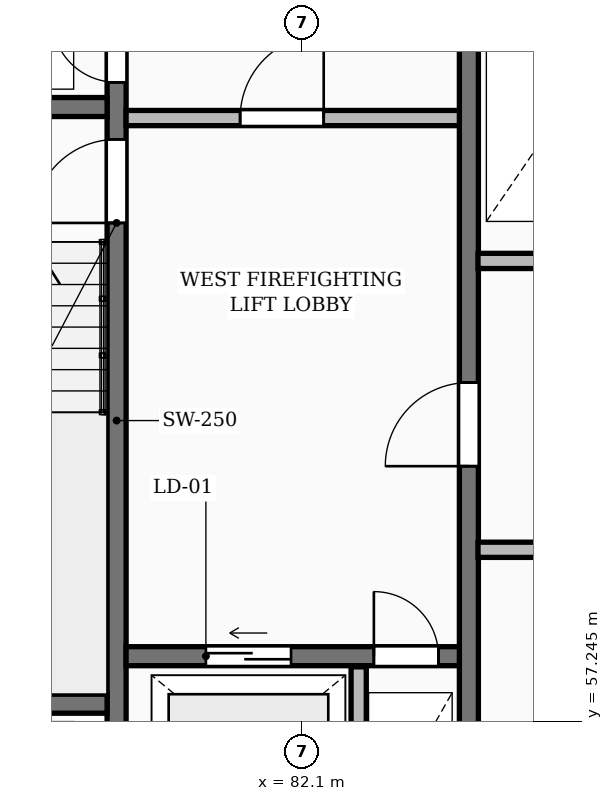
"""IFC4 building model, lengths in metres.
Left out: names, types, materials, properties, quantities, classifications, styles, units other than length and angle.
Written with IfcOpenShell. Run it as: python <this file> out.ifc"""

import sys

from ifc_helpers import new_model, si_unit, direction, frame, frame_2d, origin, place, context, subcontext, project, spatial, rectangle, extrude, element, fill, save


model = new_model("IFC4")
c1 = context("Model", 3, precision=1e-05, world=origin(), true_north=direction((0.0, 1.0)))
c2 = subcontext(c1, "Body", "Model", "MODEL_VIEW")
j1 = project(units=[si_unit("LENGTHUNIT", "METRE"), si_unit("PLANEANGLEUNIT", "RADIAN")], contexts=[c1])
p1 = place(None, origin())
s1 = spatial("IfcSite", under=j1, at=p1, CompositionType="ELEMENT")
p2 = place(p1, origin())
s2 = spatial("IfcBuilding", under=s1, at=p2, CompositionType="ELEMENT")
p3 = place(p2, frame((0.0, 0.0, 162.1)))
s3 = spatial("IfcBuildingStorey", under=s2, at=p3, CompositionType="ELEMENT", Elevation=162.1)
p4 = place(p3, frame((79.665, 55.4, 0.0), z_axis=(0.0, 0.0, 1.0), x_axis=(0.0, 1.0, 0.0)))
e1 = element("IfcWall", 1, at=p4, inside=s3, PredefinedType="SHEAR", context=c2, shape_type="SweptSolid", body=[
    extrude(rectangle(XDim=11.6, YDim=0.25, at=frame_2d((5.8, 0.0))), origin(), (0.0, 0.0, 1.0), 3.25),
])
p5 = place(p4, frame((0.55, 0.0, 0.0)))
e2 = element("IfcOpeningElement", 2, at=p5, cuts=e1, PredefinedType="OPENING", context=c2, shape_type="SweptSolid", body=[
    extrude(rectangle(XDim=0.85, YDim=2.05, at=frame_2d((0.425, 1.025))), frame((0.0, 0.135, 0.0), z_axis=(0.0, -1.0, 0.0), x_axis=(1.0, 0.0, 0.0)), (0.0, 0.0, 1.0), 0.27),
])
p6 = place(p4, frame((8.4, 0.0, 0.0)))
e3 = element("IfcOpeningElement", 3, at=p6, cuts=e1, PredefinedType="OPENING", context=c2, shape_type="SweptSolid", body=[
    extrude(rectangle(XDim=1.1, YDim=2.1, at=frame_2d((0.55, 1.05))), frame((0.0, 0.135, 0.0), z_axis=(0.0, -1.0, 0.0), x_axis=(1.0, 0.0, 0.0)), (0.0, 0.0, 1.0), 0.27),
])
p7 = place(p4, frame((10.25, 0.0, 0.0)))
e4 = element("IfcOpeningElement", 4, at=p7, cuts=e1, PredefinedType="OPENING", context=c2, shape_type="SweptSolid", body=[
    extrude(rectangle(XDim=0.85, YDim=2.05, at=frame_2d((0.425, 1.025))), frame((0.0, 0.135, 0.0), z_axis=(0.0, -1.0, 0.0), x_axis=(1.0, 0.0, 0.0)), (0.0, 0.0, 1.0), 0.27),
])
for number, where, z_axis, x_axis in (
    (5, (76.3, 57.475, 0.0), (0.0, 0.0, 1.0), (1.0, 0.0, 0.0)),
    (6, (76.3, 65.325, 0.0), (0.0, 0.0, 1.0), (1.0, 0.0, 0.0)),
):
    element("IfcWall", number, at=place(p3, frame(where, z_axis=z_axis, x_axis=x_axis)), inside=s3, PredefinedType="SHEAR", context=c2, shape_type="SweptSolid", body=[
        extrude(rectangle(XDim=3.24, YDim=0.25, at=frame_2d((1.62, 0.0))), origin(), (0.0, 0.0, 1.0), 3.25),
    ])
p8 = place(p3, frame((79.79, 58.1, 0.0), z_axis=(0.0, 0.0, 1.0), x_axis=(1.0, 0.0, 0.0)))
e7 = element("IfcWall", 7, at=p8, inside=s3, PredefinedType="SHEAR", context=c2, shape_type="SweptSolid", body=[
    extrude(rectangle(XDim=4.39, YDim=0.25, at=frame_2d((2.195, 0.0))), origin(), (0.0, 0.0, 1.0), 3.25),
])
p9 = place(p8, frame((1.05, 0.0, 0.0)))
e8 = element("IfcOpeningElement", 8, at=p9, cuts=e7, PredefinedType="OPENING", context=c2, shape_type="SweptSolid", body=[
    extrude(rectangle(XDim=1.12, YDim=2.12, at=frame_2d((0.56, 1.06))), frame((0.0, 0.135, 0.0), z_axis=(0.0, -1.0, 0.0), x_axis=(1.0, 0.0, 0.0)), (0.0, 0.0, 1.0), 0.27),
])
p10 = place(p8, frame((3.26, 0.0, 0.0)))
e9 = element("IfcOpeningElement", 9, at=p10, cuts=e7, PredefinedType="OPENING", context=c2, shape_type="SweptSolid", body=[
    extrude(rectangle(XDim=0.85, YDim=2.05, at=frame_2d((0.425, 1.025))), frame((0.0, 0.135, 0.0), z_axis=(0.0, -1.0, 0.0), x_axis=(1.0, 0.0, 0.0)), (0.0, 0.0, 1.0), 0.27),
])
p11 = place(p3, frame((82.85, 55.4, 0.0), z_axis=(0.0, 0.0, 1.0), x_axis=(0.0, 1.0, 0.0)))
e10 = element("IfcWall", 10, at=p11, inside=s3, PredefinedType="PARTITIONING", context=c2, shape_type="SweptSolid", body=[
    extrude(rectangle(XDim=2.56, YDim=0.2, at=frame_2d((1.28, 0.0))), origin(), (0.0, 0.0, 1.0), 2.97),
])
p12 = place(p3, frame((79.79, 65.18, 0.0), z_axis=(0.0, 0.0, 1.0), x_axis=(1.0, 0.0, 0.0)))
e11 = element("IfcWall", 11, at=p12, inside=s3, PredefinedType="PARTITIONING", context=c2, shape_type="SweptSolid", body=[
    extrude(rectangle(XDim=4.39, YDim=0.2, at=frame_2d((2.195, 0.0))), origin(), (0.0, 0.0, 1.0), 2.97),
])
p13 = place(p12, frame((1.5, 0.0, 0.0)))
e12 = element("IfcOpeningElement", 12, at=p13, cuts=e11, PredefinedType="OPENING", context=c2, shape_type="SweptSolid", body=[
    extrude(rectangle(XDim=1.1, YDim=2.1, at=frame_2d((0.55, 1.05))), frame((0.0, 0.11, 0.0), z_axis=(0.0, -1.0, 0.0), x_axis=(1.0, 0.0, 0.0)), (0.0, 0.0, 1.0), 0.22),
])
p14 = place(p3, frame((84.3, 55.4, 0.0), z_axis=(0.0, 0.0, 1.0), x_axis=(0.0, 1.0, 0.0)))
e13 = element("IfcWall", 13, at=p14, inside=s3, PredefinedType="SHEAR", context=c2, shape_type="SweptSolid", body=[
    extrude(rectangle(XDim=11.6, YDim=0.25, at=frame_2d((5.8, 0.0))), origin(), (0.0, 0.0, 1.0), 3.25),
])
p15 = place(p14, frame((5.2, 0.0, 0.0)))
e14 = element("IfcOpeningElement", 14, at=p15, cuts=e13, PredefinedType="OPENING", context=c2, shape_type="SweptSolid", body=[
    extrude(rectangle(XDim=1.1, YDim=2.1, at=frame_2d((0.55, 1.05))), frame((0.0, 0.135, 0.0), z_axis=(0.0, -1.0, 0.0), x_axis=(1.0, 0.0, 0.0)), (0.0, 0.0, 1.0), 0.27),
])
p16 = place(p3, frame((84.42, 59.5, 0.0), z_axis=(0.0, 0.0, 1.0), x_axis=(1.0, 0.0, 0.0)))
e15 = element("IfcWall", 15, at=p16, inside=s3, PredefinedType="PARTITIONING", context=c2, shape_type="SweptSolid", body=[
    extrude(rectangle(XDim=8.36, YDim=0.2, at=frame_2d((4.18, 0.0))), origin(), (0.0, 0.0, 1.0), 2.97),
])
p17 = place(p16, frame((3.4, 0.0, 0.0)))
e16 = element("IfcOpeningElement", 16, at=p17, cuts=e15, PredefinedType="OPENING", context=c2, shape_type="SweptSolid", body=[
    extrude(rectangle(XDim=0.92, YDim=2.08, at=frame_2d((0.46, 1.04))), frame((0.0, 0.11, 0.0), z_axis=(0.0, -1.0, 0.0), x_axis=(1.0, 0.0, 0.0)), (0.0, 0.0, 1.0), 0.22),
])
p18 = place(p3, frame((84.42, 63.3, 0.0), z_axis=(0.0, 0.0, 1.0), x_axis=(1.0, 0.0, 0.0)))
e17 = element("IfcWall", 17, at=p18, inside=s3, PredefinedType="PARTITIONING", context=c2, shape_type="SweptSolid", body=[
    extrude(rectangle(XDim=19.83, YDim=0.2, at=frame_2d((9.915, 0.0))), origin(), (0.0, 0.0, 1.0), 2.97),
])
p19 = place(p18, frame((1.15, 0.0, 0.0)))
e18 = element("IfcOpeningElement", 18, at=p19, cuts=e17, PredefinedType="OPENING", context=c2, shape_type="SweptSolid", body=[
    extrude(rectangle(XDim=0.85, YDim=2.05, at=frame_2d((0.425, 1.025))), frame((0.0, 0.11, 0.0), z_axis=(0.0, -1.0, 0.0), x_axis=(1.0, 0.0, 0.0)), (0.0, 0.0, 1.0), 0.22),
])
p20 = place(p18, frame((3.25, 0.0, 0.0)))
e19 = element("IfcOpeningElement", 19, at=p20, cuts=e17, PredefinedType="OPENING", context=c2, shape_type="SweptSolid", body=[
    extrude(rectangle(XDim=0.85, YDim=2.05, at=frame_2d((0.425, 1.025))), frame((0.0, 0.11, 0.0), z_axis=(0.0, -1.0, 0.0), x_axis=(1.0, 0.0, 0.0)), (0.0, 0.0, 1.0), 0.22),
])
p21 = place(p18, frame((13.08, 0.0, 0.0)))
e20 = element("IfcOpeningElement", 20, at=p21, cuts=e17, PredefinedType="OPENING", context=c2, shape_type="SweptSolid", body=[
    extrude(rectangle(XDim=1.5, YDim=2.2, at=frame_2d((0.75, 1.1))), frame((0.0, 0.11, 0.0), z_axis=(0.0, -1.0, 0.0), x_axis=(1.0, 0.0, 0.0)), (0.0, 0.0, 1.0), 0.22),
])
p22 = place(p18, frame((5.53, 0.0, 0.0)))
e21 = element("IfcOpeningElement", 21, at=p22, cuts=e17, PredefinedType="OPENING", context=c2, shape_type="SweptSolid", body=[
    extrude(rectangle(XDim=0.88, YDim=2.06, at=frame_2d((0.44, 1.03))), frame((0.0, 0.11, 0.0), z_axis=(0.0, -1.0, 0.0), x_axis=(1.0, 0.0, 0.0)), (0.0, 0.0, 1.0), 0.22),
])
p23 = place(p18, frame((7.68, 0.0, 0.0)))
e22 = element("IfcOpeningElement", 22, at=p23, cuts=e17, PredefinedType="OPENING", context=c2, shape_type="SweptSolid", body=[
    extrude(rectangle(XDim=0.88, YDim=2.06, at=frame_2d((0.44, 1.03))), frame((0.0, 0.11, 0.0), z_axis=(0.0, -1.0, 0.0), x_axis=(1.0, 0.0, 0.0)), (0.0, 0.0, 1.0), 0.22),
])
p24 = place(p18, frame((10.43, 0.0, 0.0)))
e23 = element("IfcOpeningElement", 23, at=p24, cuts=e17, PredefinedType="OPENING", context=c2, shape_type="SweptSolid", body=[
    extrude(rectangle(XDim=0.85, YDim=2.05, at=frame_2d((0.425, 1.025))), frame((0.0, 0.11, 0.0), z_axis=(0.0, -1.0, 0.0), x_axis=(1.0, 0.0, 0.0)), (0.0, 0.0, 1.0), 0.22),
])
p25 = place(p18, frame((16.23, 0.0, 0.0)))
e24 = element("IfcOpeningElement", 24, at=p25, cuts=e17, PredefinedType="OPENING", context=c2, shape_type="SweptSolid", body=[
    extrude(rectangle(XDim=0.96, YDim=2.1, at=frame_2d((0.48, 1.05))), frame((0.0, 0.11, 0.0), z_axis=(0.0, -1.0, 0.0), x_axis=(1.0, 0.0, 0.0)), (0.0, 0.0, 1.0), 0.22),
])
p26 = place(p18, frame((18.68, 0.0, 0.0)))
e25 = element("IfcOpeningElement", 25, at=p26, cuts=e17, PredefinedType="OPENING", context=c2, shape_type="SweptSolid", body=[
    extrude(rectangle(XDim=0.84, YDim=2.04, at=frame_2d((0.42, 1.02))), frame((0.0, 0.11, 0.0), z_axis=(0.0, -1.0, 0.0), x_axis=(1.0, 0.0, 0.0)), (0.0, 0.0, 1.0), 0.22),
])
p27 = place(p6, origin())
e26 = element("IfcDoor", 26, at=p27, inside=s3, OperationType="SINGLE_SWING_LEFT", PredefinedType="DOOR", context=c2, shape_type="SweptSolid", body=[
    extrude(rectangle(XDim=1.1, YDim=2.1, at=frame_2d((0.55, 1.05))), frame((0.0, 0.025, 0.0), z_axis=(0.0, -1.0, 0.0), x_axis=(1.0, 0.0, 0.0)), (0.0, 0.0, 1.0), 0.05),
])
fill(e3, e26)
p28 = place(p7, origin())
e27 = element("IfcDoor", 27, at=p28, inside=s3, OperationType="SINGLE_SWING_RIGHT", PredefinedType="DOOR", context=c2, shape_type="SweptSolid", body=[
    extrude(rectangle(XDim=0.85, YDim=2.05, at=frame_2d((0.425, 1.025))), frame((0.0, 0.025, 0.0), z_axis=(0.0, -1.0, 0.0), x_axis=(1.0, 0.0, 0.0)), (0.0, 0.0, 1.0), 0.05),
])
fill(e4, e27)
p29 = place(p9, origin())
e28 = element("IfcDoor", 28, at=p29, inside=s3, OperationType="SLIDING_TO_LEFT", PredefinedType="DOOR", context=c2, shape_type="SweptSolid", body=[
    extrude(rectangle(XDim=1.12, YDim=2.12, at=frame_2d((0.56, 1.06))), frame((0.0, 0.025, 0.0), z_axis=(0.0, -1.0, 0.0), x_axis=(1.0, 0.0, 0.0)), (0.0, 0.0, 1.0), 0.05),
])
fill(e8, e28)
p30 = place(p10, origin())
e29 = element("IfcDoor", 29, at=p30, inside=s3, OperationType="SINGLE_SWING_LEFT", PredefinedType="DOOR", context=c2, shape_type="SweptSolid", body=[
    extrude(rectangle(XDim=0.85, YDim=2.05, at=frame_2d((0.425, 1.025))), frame((0.0, 0.025, 0.0), z_axis=(0.0, -1.0, 0.0), x_axis=(1.0, 0.0, 0.0)), (0.0, 0.0, 1.0), 0.05),
])
fill(e9, e29)
p31 = place(p13, origin())
e30 = element("IfcDoor", 30, at=p31, inside=s3, OperationType="SINGLE_SWING_RIGHT", PredefinedType="DOOR", context=c2, shape_type="SweptSolid", body=[
    extrude(rectangle(XDim=1.1, YDim=2.1, at=frame_2d((0.55, 1.05))), frame((0.0, 0.025, 0.0), z_axis=(0.0, -1.0, 0.0), x_axis=(1.0, 0.0, 0.0)), (0.0, 0.0, 1.0), 0.05),
])
fill(e12, e30)
p32 = place(p15, origin())
e31 = element("IfcDoor", 31, at=p32, inside=s3, OperationType="SINGLE_SWING_LEFT", PredefinedType="DOOR", context=c2, shape_type="SweptSolid", body=[
    extrude(rectangle(XDim=1.1, YDim=2.1, at=frame_2d((0.55, 1.05))), frame((0.0, 0.025, 0.0), z_axis=(0.0, -1.0, 0.0), x_axis=(1.0, 0.0, 0.0)), (0.0, 0.0, 1.0), 0.05),
])
fill(e14, e31)
save(model, sys.argv[1])
